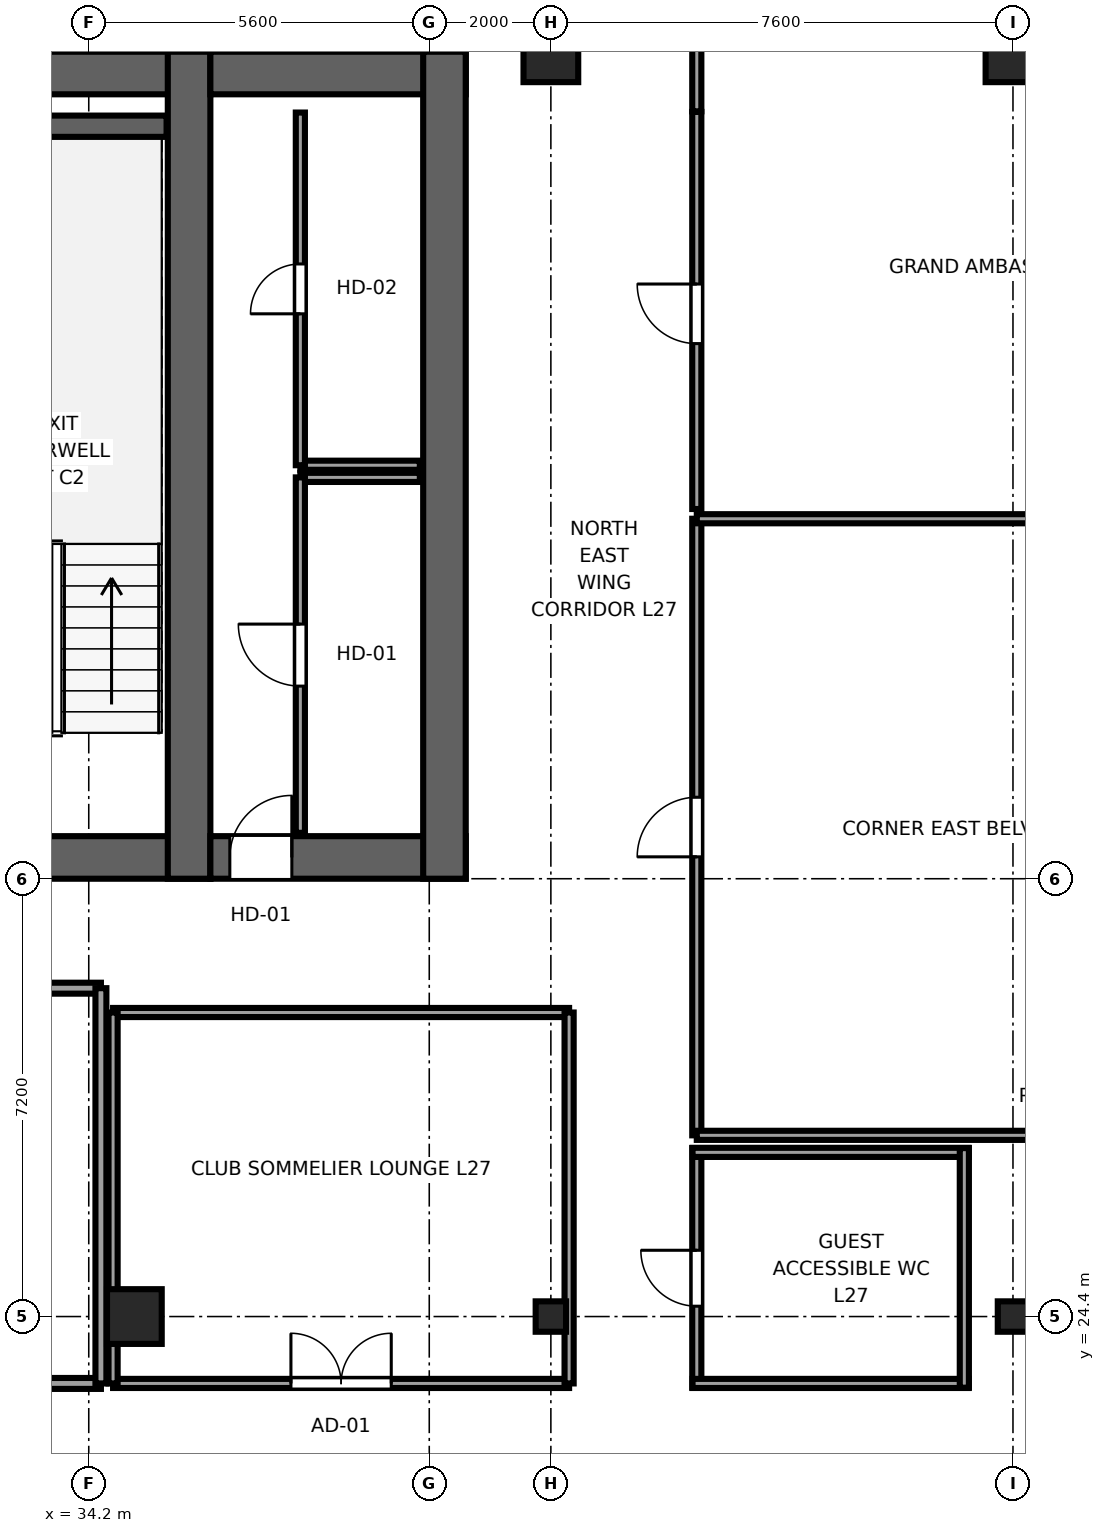
"""IFC4 building model, lengths in metres.
Left out: names, types, materials, properties, quantities, classifications, styles, units other than length and angle.
Written with IfcOpenShell. Run it as: python <this file> out.ifc"""

import sys

from ifc_helpers import new_model, si_unit, direction, frame, frame_2d, origin, origin_2d, place, context, subcontext, project, spatial, rectangle, i_section, extrude, source, transform, mapped, element, fill, save


model = new_model("IFC4")
c1 = context("Model", 3, precision=1e-05, world=origin(), true_north=direction((0.0, 1.0)))
c2 = subcontext(c1, "Body", "Model", "MODEL_VIEW")
j1 = project(units=[si_unit("LENGTHUNIT", "METRE"), si_unit("PLANEANGLEUNIT", "RADIAN")], contexts=[c1])
p1 = place(None, origin())
s1 = spatial("IfcSite", under=j1, at=p1, CompositionType="ELEMENT")
p2 = place(p1, origin())
s2 = spatial("IfcBuilding", under=s1, at=p2, CompositionType="ELEMENT")
p3 = place(p2, frame((0.0, 0.0, 108.0)))
s3 = spatial("IfcBuildingStorey", under=s2, at=p3, CompositionType="ELEMENT", Elevation=108.0)
p4 = place(p3, frame((9.8, 31.95, 0.0), z_axis=(0.0, 0.0, 1.0), x_axis=(1.0, 0.0, 0.0)))
e1 = element("IfcWall", 1, at=p4, inside=s3, PredefinedType="SHEAR", context=c2, shape_type="SweptSolid", body=[
    extrude(rectangle(XDim=26.4, YDim=0.7, at=frame_2d((13.2, 0.0))), origin(), (0.0, 0.0, 1.0), 3.55),
])
p5 = place(p4, frame((7.65, 0.0, 0.0), z_axis=(0.0, 0.0, 1.0), x_axis=(-1.0, 0.0, 0.0)))
e2 = element("IfcOpeningElement", 2, at=p5, cuts=e1, PredefinedType="OPENING", context=c2, shape_type="SweptSolid", body=[
    extrude(rectangle(XDim=1.5, YDim=2.04, at=frame_2d((0.75, 1.02))), frame((0.0, 0.36, 0.0), z_axis=(0.0, -1.0, 0.0), x_axis=(1.0, 0.0, 0.0)), (0.0, 0.0, 1.0), 0.72),
])
p6 = place(p4, frame((13.95, 0.0, 0.0), z_axis=(0.0, 0.0, 1.0), x_axis=(-1.0, 0.0, 0.0)))
e3 = element("IfcOpeningElement", 3, at=p6, cuts=e1, PredefinedType="OPENING", context=c2, shape_type="SweptSolid", body=[
    extrude(rectangle(XDim=1.5, YDim=2.04, at=frame_2d((0.75, 1.02))), frame((0.0, 0.36, 0.0), z_axis=(0.0, -1.0, 0.0), x_axis=(1.0, 0.0, 0.0)), (0.0, 0.0, 1.0), 0.72),
])
p7 = place(p4, frame((20.25, 0.0, 0.0), z_axis=(0.0, 0.0, 1.0), x_axis=(-1.0, 0.0, 0.0)))
e4 = element("IfcOpeningElement", 4, at=p7, cuts=e1, PredefinedType="OPENING", context=c2, shape_type="SweptSolid", body=[
    extrude(rectangle(XDim=1.5, YDim=2.04, at=frame_2d((0.75, 1.02))), frame((0.0, 0.36, 0.0), z_axis=(0.0, -1.0, 0.0), x_axis=(1.0, 0.0, 0.0)), (0.0, 0.0, 1.0), 0.72),
])
p8 = place(p3, frame((9.8, 44.85, 0.0), z_axis=(0.0, 0.0, 1.0), x_axis=(1.0, 0.0, 0.0)))
e5 = element("IfcWall", 5, at=p8, inside=s3, PredefinedType="SHEAR", context=c2, shape_type="SweptSolid", body=[
    extrude(rectangle(XDim=26.4, YDim=0.7, at=frame_2d((13.2, 0.0))), origin(), (0.0, 0.0, 1.0), 3.55),
])
p9 = place(p3, frame((35.85, 31.6, 0.0), z_axis=(0.0, 0.0, 1.0), x_axis=(0.0, 1.0, 0.0)))
e6 = element("IfcWall", 6, at=p9, inside=s3, PredefinedType="SHEAR", context=c2, shape_type="SweptSolid", body=[
    extrude(rectangle(XDim=13.6, YDim=0.7, at=frame_2d((6.8, 0.0))), origin(), (0.0, 0.0, 1.0), 3.55),
])
p10 = place(p3, frame((36.2, 31.95, 0.0), z_axis=(0.0, 0.0, 1.0), x_axis=(1.0, 0.0, 0.0)))
e7 = element("IfcWall", 7, at=p10, inside=s3, PredefinedType="SHEAR", context=c2, shape_type="SweptSolid", body=[
    extrude(rectangle(XDim=4.2, YDim=0.7, at=frame_2d((2.1, 0.0))), origin(), (0.0, 0.0, 1.0), 3.55),
])
p11 = place(p10, frame((1.34, 0.0, 0.0), z_axis=(0.0, 0.0, 1.0), x_axis=(-1.0, 0.0, 0.0)))
e8 = element("IfcOpeningElement", 8, at=p11, cuts=e7, PredefinedType="OPENING", context=c2, shape_type="SweptSolid", body=[
    extrude(rectangle(XDim=1.02, YDim=2.03, at=frame_2d((0.51, 1.015))), frame((0.0, 0.36, 0.0), z_axis=(0.0, -1.0, 0.0), x_axis=(1.0, 0.0, 0.0)), (0.0, 0.0, 1.0), 0.72),
])
p12 = place(p3, frame((36.2, 44.85, 0.0), z_axis=(0.0, 0.0, 1.0), x_axis=(1.0, 0.0, 0.0)))
e9 = element("IfcWall", 9, at=p12, inside=s3, PredefinedType="SHEAR", context=c2, shape_type="SweptSolid", body=[
    extrude(rectangle(XDim=4.2, YDim=0.7, at=frame_2d((2.1, 0.0))), origin(), (0.0, 0.0, 1.0), 3.55),
])
p13 = place(p3, frame((40.05, 31.6, 0.0), z_axis=(0.0, 0.0, 1.0), x_axis=(0.0, 1.0, 0.0)))
e10 = element("IfcWall", 10, at=p13, inside=s3, PredefinedType="SHEAR", context=c2, shape_type="SweptSolid", body=[
    extrude(rectangle(XDim=13.6, YDim=0.7, at=frame_2d((6.8, 0.0))), origin(), (0.0, 0.0, 1.0), 3.55),
])
p14 = place(p3, frame((31.88, 43.975, 0.0), z_axis=(0.0, 0.0, 1.0), x_axis=(1.0, 0.0, 0.0)))
e11 = element("IfcWall", 11, at=p14, inside=s3, PredefinedType="SHEAR", context=c2, shape_type="SweptSolid", body=[
    extrude(rectangle(XDim=3.6, YDim=0.35, at=frame_2d((1.8, 0.0))), origin(), (0.0, 0.0, 1.0), 3.55),
])
m1 = source(origin(), c2, "Body", "SweptSolid", [
    extrude(rectangle(XDim=0.9, YDim=0.9, at=origin_2d()), origin(), (0.0, 0.0, 1.0), 3.55),
])
p15 = place(p3, frame((34.95, 24.4, 0.0), z_axis=(0.0, 0.0, 1.0), x_axis=(1.0, 0.0, 0.0)))
e12 = element("IfcColumn", 12, at=p15, inside=s3, PredefinedType="COLUMN", context=c2, shape_type="MappedRepresentation", body=[
    mapped(m1, transform((0.0, 0.0, 0.0), x_axis=(1.0, 0.0, 0.0), y_axis=(0.0, 1.0, 0.0), z_axis=(0.0, 0.0, 1.0), scale=1.0)),
])
m2 = source(origin(), c2, "Body", "SweptSolid", [
    extrude(i_section(OverallWidth=0.5, OverallDepth=0.5, WebThickness=0.022, FlangeThickness=0.034, at=origin_2d()), origin(), (0.0, 0.0, 1.0), 3.55),
])
for number, where, z_axis, x_axis in (
    (13, (41.8, 24.4, 0.0), (0.0, 0.0, 1.0), (1.0, 0.0, 0.0)),
    (14, (49.4, 24.4, 0.0), (0.0, 0.0, 1.0), (1.0, 0.0, 0.0)),
):
    element("IfcColumn", number, at=place(p3, frame(where, z_axis=z_axis, x_axis=x_axis)), inside=s3, PredefinedType="COLUMN", context=c2, shape_type="MappedRepresentation", body=[
        mapped(m2, transform((0.0, 0.0, 0.0), x_axis=(1.0, 0.0, 0.0), y_axis=(0.0, 1.0, 0.0), z_axis=(0.0, 0.0, 1.0), scale=1.0)),
    ])
for number, where, z_axis, x_axis in (
    (15, (41.8, 45.15, 0.0), (0.0, 0.0, 1.0), (1.0, 0.0, 0.0)),
    (16, (49.4, 45.15, 0.0), (0.0, 0.0, 1.0), (1.0, 0.0, 0.0)),
):
    element("IfcColumn", number, at=place(p3, frame(where, z_axis=z_axis, x_axis=x_axis)), inside=s3, PredefinedType="COLUMN", context=c2, shape_type="MappedRepresentation", body=[
        mapped(m1, transform((0.0, 0.0, 0.0), x_axis=(1.0, 0.0, 0.0), y_axis=(0.0, 1.0, 0.0), z_axis=(0.0, 0.0, 1.0), scale=1.0)),
    ])
p16 = place(p3, frame((37.68, 38.2, 0.0), z_axis=(0.0, 0.0, 1.0), x_axis=(1.0, 0.0, 0.0)))
e17 = element("IfcWall", 17, at=p16, inside=s3, PredefinedType="PARTITIONING", context=c2, shape_type="SweptSolid", body=[
    extrude(rectangle(XDim=1.965, YDim=0.15, at=frame_2d((0.982, 0.0))), origin(), (0.0, 0.0, 1.0), 3.37),
])
p17 = place(p3, frame((37.68, 32.355, 0.0), z_axis=(0.0, 0.0, 1.0), x_axis=(0.0, 1.0, 0.0)))
e18 = element("IfcWall", 18, at=p17, inside=s3, PredefinedType="PARTITIONING", context=c2, shape_type="SweptSolid", body=[
    extrude(rectangle(XDim=5.845, YDim=0.15, at=frame_2d((2.922, 0.0))), origin(), (0.0, 0.0, 1.0), 3.37),
])
p18 = place(p17, frame((2.413, 0.0, 0.0)))
e19 = element("IfcOpeningElement", 19, at=p18, cuts=e18, PredefinedType="OPENING", context=c2, shape_type="SweptSolid", body=[
    extrude(rectangle(XDim=1.02, YDim=2.03, at=frame_2d((0.51, 1.015))), frame((0.0, 0.085, 0.0), z_axis=(0.0, -1.0, 0.0), x_axis=(1.0, 0.0, 0.0)), (0.0, 0.0, 1.0), 0.17),
])
p19 = place(p3, frame((37.68, 38.4, 0.0), z_axis=(0.0, 0.0, 1.0), x_axis=(1.0, 0.0, 0.0)))
e20 = element("IfcWall", 20, at=p19, inside=s3, PredefinedType="PARTITIONING", context=c2, shape_type="SweptSolid", body=[
    extrude(rectangle(XDim=1.965, YDim=0.15, at=frame_2d((0.982, 0.0))), origin(), (0.0, 0.0, 1.0), 3.37),
])
p20 = place(p3, frame((37.68, 38.4, 0.0), z_axis=(0.0, 0.0, 1.0), x_axis=(0.0, 1.0, 0.0)))
e21 = element("IfcWall", 21, at=p20, inside=s3, PredefinedType="PARTITIONING", context=c2, shape_type="SweptSolid", body=[
    extrude(rectangle(XDim=5.8, YDim=0.15, at=frame_2d((2.9, 0.0))), origin(), (0.0, 0.0, 1.0), 3.37),
])
p21 = place(p20, frame((2.49, 0.0, 0.0)))
e22 = element("IfcOpeningElement", 22, at=p21, cuts=e21, PredefinedType="OPENING", context=c2, shape_type="SweptSolid", body=[
    extrude(rectangle(XDim=0.82, YDim=2.01, at=frame_2d((0.41, 1.005))), frame((0.0, 0.085, 0.0), z_axis=(0.0, -1.0, 0.0), x_axis=(1.0, 0.0, 0.0)), (0.0, 0.0, 1.0), 0.17),
])
p22 = place(p3, frame((44.2, 23.23, 0.0), z_axis=(0.0, 0.0, 1.0), x_axis=(0.0, 1.0, 0.0)))
e23 = element("IfcWall", 23, at=p22, inside=s3, PredefinedType="PARTITIONING", context=c2, shape_type="SweptSolid", body=[
    extrude(rectangle(XDim=3.94, YDim=0.15, at=frame_2d((1.97, 0.0))), origin(), (0.0, 0.0, 1.0), 3.37),
])
p23 = place(p22, frame((1.34, 0.0, 0.0)))
e24 = element("IfcOpeningElement", 24, at=p23, cuts=e23, PredefinedType="OPENING", context=c2, shape_type="SweptSolid", body=[
    extrude(rectangle(XDim=0.92, YDim=2.01, at=frame_2d((0.46, 1.005))), frame((0.0, 0.085, 0.0), z_axis=(0.0, -1.0, 0.0), x_axis=(1.0, 0.0, 0.0)), (0.0, 0.0, 1.0), 0.17),
])
for number, where, z_axis, x_axis in (
    (25, (44.13, 23.3, 0.0), (0.0, 0.0, 1.0), (1.0, 0.0, 0.0)),
    (26, (44.13, 27.1, 0.0), (0.0, 0.0, 1.0), (1.0, 0.0, 0.0)),
):
    element("IfcWall", number, at=place(p3, frame(where, z_axis=z_axis, x_axis=x_axis)), inside=s3, PredefinedType="PARTITIONING", context=c2, shape_type="SweptSolid", body=[
        extrude(rectangle(XDim=4.54, YDim=0.15, at=frame_2d((2.27, 0.0))), origin(), (0.0, 0.0, 1.0), 3.37),
    ])
p24 = place(p3, frame((48.6, 23.23, 0.0), z_axis=(0.0, 0.0, 1.0), x_axis=(0.0, 1.0, 0.0)))
e27 = element("IfcWall", 27, at=p24, inside=s3, PredefinedType="PARTITIONING", context=c2, shape_type="SweptSolid", body=[
    extrude(rectangle(XDim=3.94, YDim=0.15, at=frame_2d((1.97, 0.0))), origin(), (0.0, 0.0, 1.0), 3.37),
])
p25 = place(p3, frame((44.2, 27.38, 0.0), z_axis=(0.0, 0.0, 1.0), x_axis=(0.0, 1.0, 0.0)))
e28 = element("IfcWall", 28, at=p25, inside=s3, PredefinedType="PARTITIONING", context=c2, shape_type="SweptSolid", body=[
    extrude(rectangle(XDim=10.14, YDim=0.15, at=frame_2d((5.07, 0.0))), origin(), (0.0, 0.0, 1.0), 3.37),
])
p26 = place(p25, frame((4.58, 0.0, 0.0)))
e29 = element("IfcOpeningElement", 29, at=p26, cuts=e28, PredefinedType="OPENING", context=c2, shape_type="SweptSolid", body=[
    extrude(rectangle(XDim=0.98, YDim=2.12, at=frame_2d((0.49, 1.06))), frame((0.0, 0.085, 0.0), z_axis=(0.0, -1.0, 0.0), x_axis=(1.0, 0.0, 0.0)), (0.0, 0.0, 1.0), 0.17),
])
p27 = place(p3, frame((44.2, 27.38, 0.0), z_axis=(0.0, 0.0, 1.0), x_axis=(1.0, 0.0, 0.0)))
e30 = element("IfcWall", 30, at=p27, inside=s3, PredefinedType="PARTITIONING", context=c2, shape_type="SweptSolid", body=[
    extrude(rectangle(XDim=12.395, YDim=0.15, at=frame_2d((6.198, 0.0))), origin(), (0.0, 0.0, 1.0), 3.37),
])
p28 = place(p3, frame((44.2, 37.52, 0.0), z_axis=(0.0, 0.0, 1.0), x_axis=(1.0, 0.0, 0.0)))
e31 = element("IfcWall", 31, at=p28, inside=s3, PredefinedType="PARTITIONING", context=c2, shape_type="SweptSolid", body=[
    extrude(rectangle(XDim=10.03, YDim=0.15, at=frame_2d((5.015, 0.0))), origin(), (0.0, 0.0, 1.0), 3.37),
])
p29 = place(p3, frame((44.2, 37.68, 0.0), z_axis=(0.0, 0.0, 1.0), x_axis=(0.0, 1.0, 0.0)))
e32 = element("IfcWall", 32, at=p29, inside=s3, PredefinedType="PARTITIONING", context=c2, shape_type="SweptSolid", body=[
    extrude(rectangle(XDim=6.53, YDim=0.15, at=frame_2d((3.265, 0.0))), origin(), (0.0, 0.0, 1.0), 3.37),
])
p30 = place(p29, frame((2.72, 0.0, 0.0)))
e33 = element("IfcOpeningElement", 33, at=p30, cuts=e32, PredefinedType="OPENING", context=c2, shape_type="SweptSolid", body=[
    extrude(rectangle(XDim=0.98, YDim=2.12, at=frame_2d((0.49, 1.06))), frame((0.0, 0.085, 0.0), z_axis=(0.0, -1.0, 0.0), x_axis=(1.0, 0.0, 0.0)), (0.0, 0.0, 1.0), 0.17),
])
p31 = place(p3, frame((44.2, 44.22, 0.0), z_axis=(0.0, 0.0, 1.0), x_axis=(0.0, 1.0, 0.0)))
e34 = element("IfcWall", 34, at=p31, inside=s3, PredefinedType="PARTITIONING", context=c2, shape_type="SweptSolid", body=[
    extrude(rectangle(XDim=1.375, YDim=0.15, at=frame_2d((0.688, 0.0))), origin(), (0.0, 0.0, 1.0), 3.37),
])
p32 = place(p3, frame((27.1, 23.3, 0.0), z_axis=(0.0, 0.0, 1.0), x_axis=(1.0, 0.0, 0.0)))
e35 = element("IfcWall", 35, at=p32, inside=s3, PredefinedType="PARTITIONING", context=c2, shape_type="SweptSolid", body=[
    extrude(rectangle(XDim=7.3, YDim=0.18, at=frame_2d((3.65, 0.0))), origin(), (0.0, 0.0, 1.0), 3.37),
])
p33 = place(p32, frame((2.825, 0.0, 0.0)))
e36 = element("IfcOpeningElement", 36, at=p33, cuts=e35, PredefinedType="OPENING", context=c2, shape_type="SweptSolid", body=[
    extrude(rectangle(XDim=1.65, YDim=2.15, at=frame_2d((0.825, 1.075))), frame((0.0, 0.1, 0.0), z_axis=(0.0, -1.0, 0.0), x_axis=(1.0, 0.0, 0.0)), (0.0, 0.0, 1.0), 0.2),
])
p34 = place(p3, frame((27.1, 29.8, 0.0), z_axis=(0.0, 0.0, 1.0), x_axis=(1.0, 0.0, 0.0)))
e37 = element("IfcWall", 37, at=p34, inside=s3, PredefinedType="PARTITIONING", context=c2, shape_type="SweptSolid", body=[
    extrude(rectangle(XDim=7.3, YDim=0.18, at=frame_2d((3.65, 0.0))), origin(), (0.0, 0.0, 1.0), 3.37),
])
p35 = place(p3, frame((34.4, 23.3, 0.0), z_axis=(0.0, 0.0, 1.0), x_axis=(0.0, 1.0, 0.0)))
e38 = element("IfcWall", 38, at=p35, inside=s3, PredefinedType="PARTITIONING", context=c2, shape_type="SweptSolid", body=[
    extrude(rectangle(XDim=6.5, YDim=0.18, at=frame_2d((3.25, 0.0))), origin(), (0.0, 0.0, 1.0), 3.37),
])
p36 = place(p3, frame((34.6, 23.3, 0.0), z_axis=(0.0, 0.0, 1.0), x_axis=(1.0, 0.0, 0.0)))
e39 = element("IfcWall", 39, at=p36, inside=s3, PredefinedType="PARTITIONING", context=c2, shape_type="SweptSolid", body=[
    extrude(rectangle(XDim=7.5, YDim=0.15, at=frame_2d((3.75, 0.0))), origin(), (0.0, 0.0, 1.0), 3.37),
])
p37 = place(p36, frame((2.925, 0.0, 0.0)))
e40 = element("IfcOpeningElement", 40, at=p37, cuts=e39, PredefinedType="OPENING", context=c2, shape_type="SweptSolid", body=[
    extrude(rectangle(XDim=1.65, YDim=2.15, at=frame_2d((0.825, 1.075))), frame((0.0, 0.085, 0.0), z_axis=(0.0, -1.0, 0.0), x_axis=(1.0, 0.0, 0.0)), (0.0, 0.0, 1.0), 0.17),
])
p38 = place(p3, frame((34.6, 29.4, 0.0), z_axis=(0.0, 0.0, 1.0), x_axis=(1.0, 0.0, 0.0)))
e41 = element("IfcWall", 41, at=p38, inside=s3, PredefinedType="PARTITIONING", context=c2, shape_type="SweptSolid", body=[
    extrude(rectangle(XDim=7.5, YDim=0.15, at=frame_2d((3.75, 0.0))), origin(), (0.0, 0.0, 1.0), 3.37),
])
p39 = place(p3, frame((34.6, 23.3, 0.0), z_axis=(0.0, 0.0, 1.0), x_axis=(0.0, 1.0, 0.0)))
e42 = element("IfcWall", 42, at=p39, inside=s3, PredefinedType="PARTITIONING", context=c2, shape_type="SweptSolid", body=[
    extrude(rectangle(XDim=6.1, YDim=0.15, at=frame_2d((3.05, 0.0))), origin(), (0.0, 0.0, 1.0), 3.37),
])
p40 = place(p3, frame((42.1, 23.3, 0.0), z_axis=(0.0, 0.0, 1.0), x_axis=(0.0, 1.0, 0.0)))
e43 = element("IfcWall", 43, at=p40, inside=s3, PredefinedType="PARTITIONING", context=c2, shape_type="SweptSolid", body=[
    extrude(rectangle(XDim=6.1, YDim=0.15, at=frame_2d((3.05, 0.0))), origin(), (0.0, 0.0, 1.0), 2.16),
])
m3 = source(origin(), c2, "Body", "SweptSolid", [
    extrude(rectangle(XDim=1.02, YDim=2.03, at=frame_2d((0.51, 1.015))), frame((0.0, 0.025, 0.0), z_axis=(0.0, -1.0, 0.0), x_axis=(1.0, 0.0, 0.0)), (0.0, 0.0, 1.0), 0.05),
])
p41 = place(p11, origin())
e44 = element("IfcDoor", 44, at=p41, inside=s3, OperationType="SINGLE_SWING_RIGHT", PredefinedType="DOOR", context=c2, shape_type="MappedRepresentation", body=[
    mapped(m3, transform((0.0, 0.0, 0.0), x_axis=(1.0, 0.0, 0.0), y_axis=(0.0, 1.0, 0.0), z_axis=(0.0, 0.0, 1.0), scale=1.0)),
])
fill(e8, e44)
p42 = place(p18, origin())
e45 = element("IfcDoor", 45, at=p42, inside=s3, OperationType="SINGLE_SWING_RIGHT", PredefinedType="DOOR", context=c2, shape_type="MappedRepresentation", body=[
    mapped(m3, transform((0.0, 0.0, 0.0), x_axis=(1.0, 0.0, 0.0), y_axis=(0.0, 1.0, 0.0), z_axis=(0.0, 0.0, 1.0), scale=1.0)),
])
fill(e19, e45)
m4 = source(origin(), c2, "Body", "SweptSolid", [
    extrude(rectangle(XDim=0.82, YDim=2.01, at=frame_2d((0.41, 1.005))), frame((0.0, 0.025, 0.0), z_axis=(0.0, -1.0, 0.0), x_axis=(1.0, 0.0, 0.0)), (0.0, 0.0, 1.0), 0.05),
])
p43 = place(p21, origin())
e46 = element("IfcDoor", 46, at=p43, inside=s3, OperationType="SINGLE_SWING_LEFT", PredefinedType="DOOR", context=c2, shape_type="MappedRepresentation", body=[
    mapped(m4, transform((0.0, 0.0, 0.0), x_axis=(1.0, 0.0, 0.0), y_axis=(0.0, 1.0, 0.0), z_axis=(0.0, 0.0, 1.0), scale=1.0)),
])
fill(e22, e46)
m5 = source(origin(), c2, "Body", "SweptSolid", [
    extrude(rectangle(XDim=0.92, YDim=2.01, at=frame_2d((0.46, 1.005))), frame((0.0, 0.025, 0.0), z_axis=(0.0, -1.0, 0.0), x_axis=(1.0, 0.0, 0.0)), (0.0, 0.0, 1.0), 0.05),
])
p44 = place(p23, origin())
e47 = element("IfcDoor", 47, at=p44, inside=s3, OperationType="SINGLE_SWING_RIGHT", PredefinedType="DOOR", context=c2, shape_type="MappedRepresentation", body=[
    mapped(m5, transform((0.0, 0.0, 0.0), x_axis=(1.0, 0.0, 0.0), y_axis=(0.0, 1.0, 0.0), z_axis=(0.0, 0.0, 1.0), scale=1.0)),
])
fill(e24, e47)
m6 = source(origin(), c2, "Body", "SweptSolid", [
    extrude(rectangle(XDim=0.98, YDim=2.12, at=frame_2d((0.49, 1.06))), frame((0.0, 0.025, 0.0), z_axis=(0.0, -1.0, 0.0), x_axis=(1.0, 0.0, 0.0)), (0.0, 0.0, 1.0), 0.05),
])
p45 = place(p26, origin())
e48 = element("IfcDoor", 48, at=p45, inside=s3, OperationType="SINGLE_SWING_LEFT", PredefinedType="DOOR", context=c2, shape_type="MappedRepresentation", body=[
    mapped(m6, transform((0.0, 0.0, 0.0), x_axis=(1.0, 0.0, 0.0), y_axis=(0.0, 1.0, 0.0), z_axis=(0.0, 0.0, 1.0), scale=1.0)),
])
fill(e29, e48)
p46 = place(p30, origin())
e49 = element("IfcDoor", 49, at=p46, inside=s3, OperationType="SINGLE_SWING_RIGHT", PredefinedType="DOOR", context=c2, shape_type="MappedRepresentation", body=[
    mapped(m6, transform((0.0, 0.0, 0.0), x_axis=(1.0, 0.0, 0.0), y_axis=(0.0, 1.0, 0.0), z_axis=(0.0, 0.0, 1.0), scale=1.0)),
])
fill(e33, e49)
m7 = source(origin(), c2, "Body", "SweptSolid", [
    extrude(rectangle(XDim=1.65, YDim=2.15, at=frame_2d((0.825, 1.075))), frame((0.0, 0.025, 0.0), z_axis=(0.0, -1.0, 0.0), x_axis=(1.0, 0.0, 0.0)), (0.0, 0.0, 1.0), 0.05),
])
p47 = place(p37, origin())
e50 = element("IfcDoor", 50, at=p47, inside=s3, OperationType="DOUBLE_DOOR_SINGLE_SWING", PredefinedType="DOOR", context=c2, shape_type="MappedRepresentation", body=[
    mapped(m7, transform((0.0, 0.0, 0.0), x_axis=(1.0, 0.0, 0.0), y_axis=(0.0, 1.0, 0.0), z_axis=(0.0, 0.0, 1.0), scale=1.0)),
])
fill(e40, e50)
save(model, sys.argv[1])
